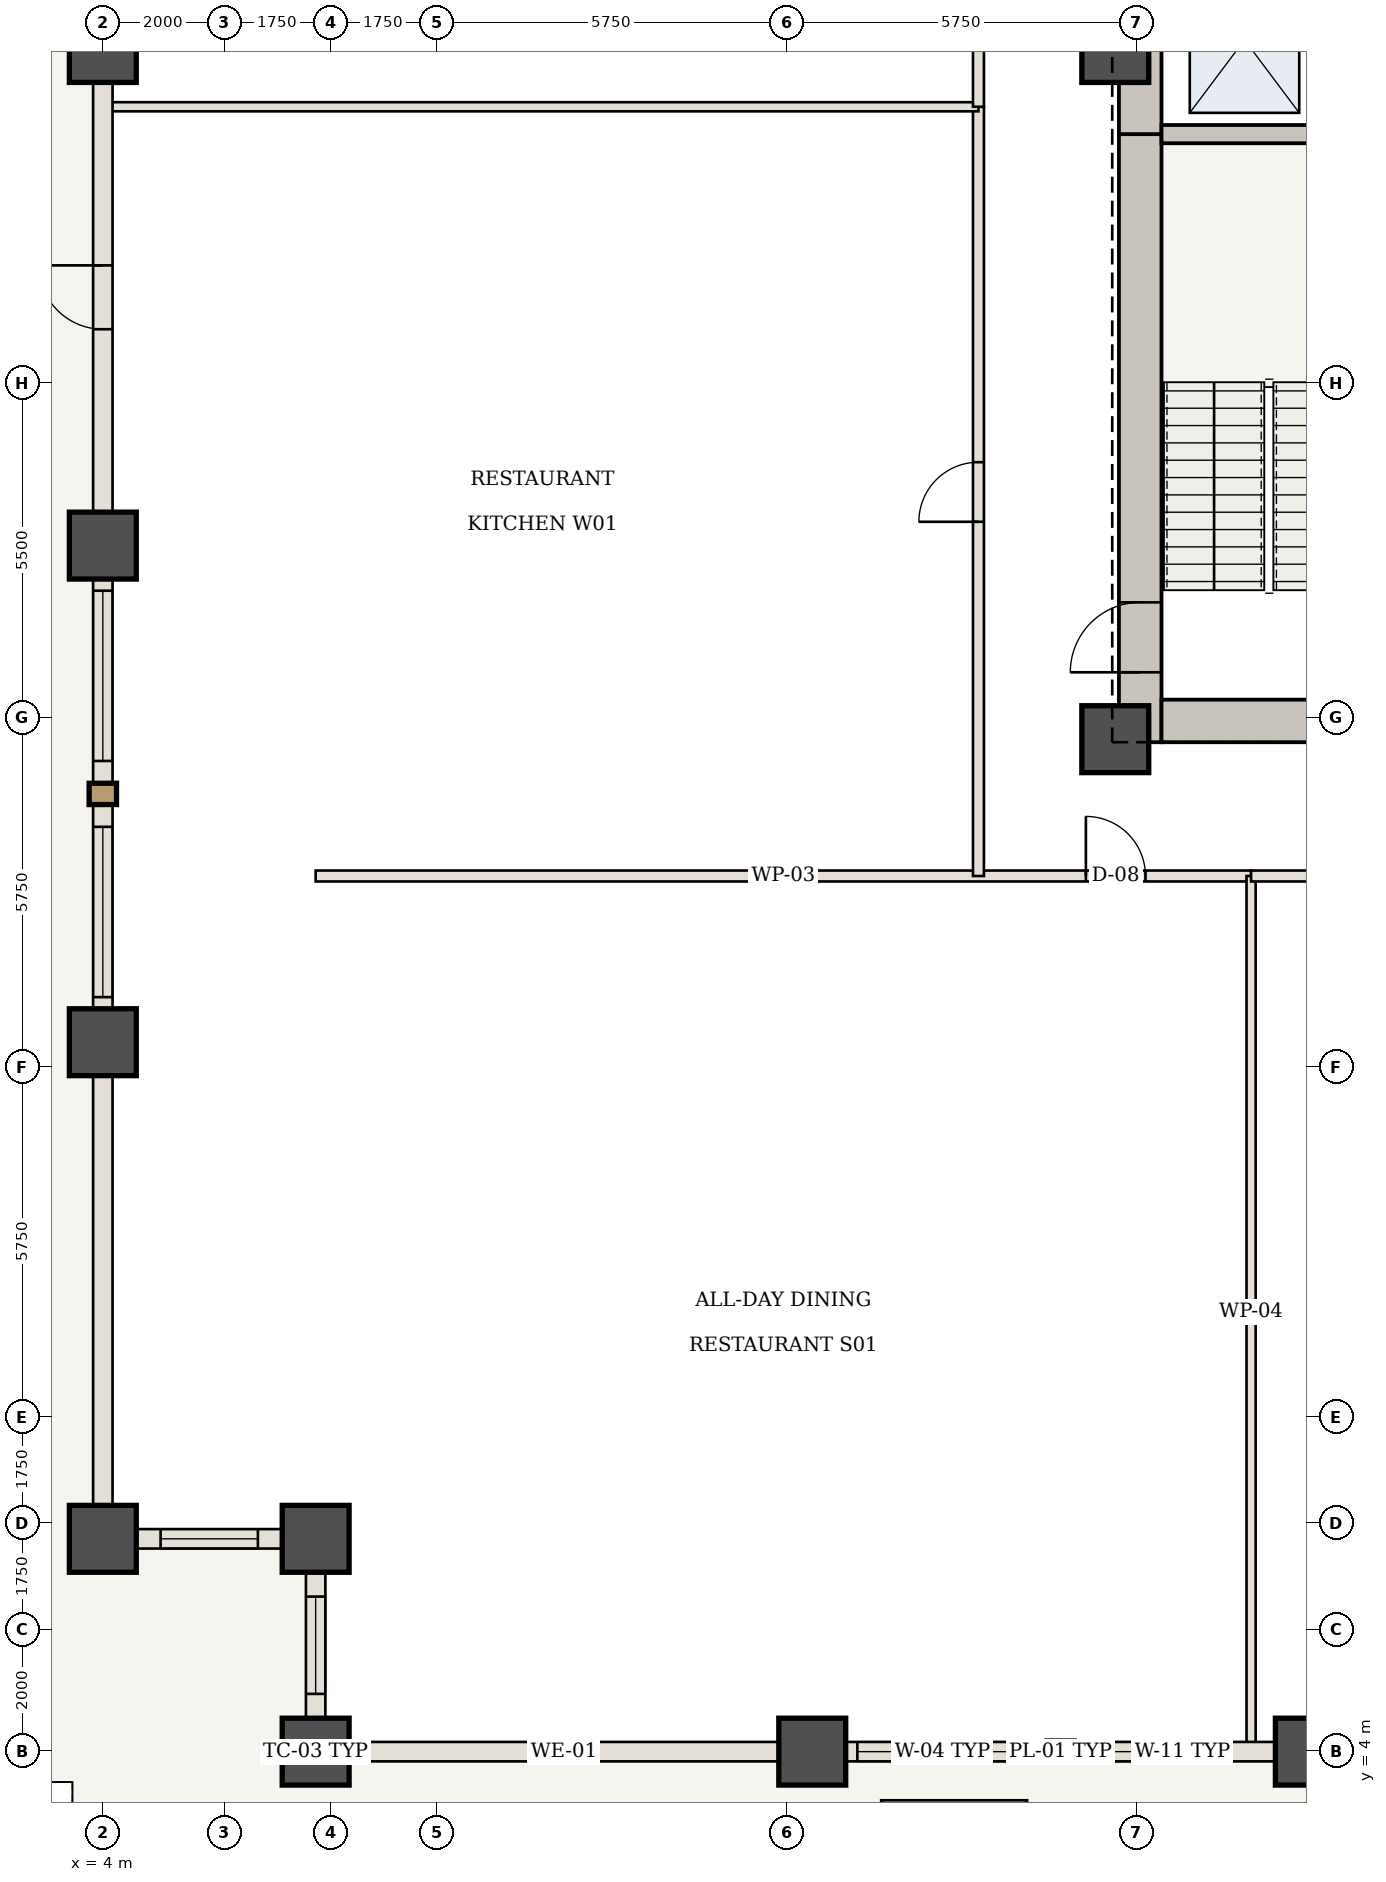
"""IFC4 building model, lengths in metres.
Left out: names, types, materials, properties, quantities, classifications, styles, units other than length and angle.
Written with IfcOpenShell. Run it as: python <this file> out.ifc"""

import sys

from ifc_helpers import new_model, si_unit, direction, frame, frame_2d, origin, origin_2d, place, context, subcontext, project, spatial, rectangle, extrude, element, fill, save


model = new_model("IFC4")
c1 = context("Model", 3, precision=1e-05, world=origin(), true_north=direction((0.0, 1.0)))
c2 = subcontext(c1, "Body", "Model", "MODEL_VIEW")
j1 = project(units=[si_unit("LENGTHUNIT", "METRE"), si_unit("PLANEANGLEUNIT", "RADIAN")], contexts=[c1])
p1 = place(None, origin())
s1 = spatial("IfcSite", under=j1, at=p1, CompositionType="ELEMENT")
p2 = place(p1, origin())
s2 = spatial("IfcBuilding", under=s1, at=p2, CompositionType="ELEMENT")
p3 = place(p2, frame((0.0, 0.0, 34.3)))
s3 = spatial("IfcBuildingStorey", under=s2, at=p3, CompositionType="ELEMENT", Elevation=34.3)
p4 = place(p3, frame((21.06, 20.6, 0.0), z_axis=(0.0, 0.0, 1.0), x_axis=(0.0, 1.0, 0.0)))
e1 = element("IfcWall", 1, at=p4, inside=s3, PredefinedType="SHEAR", context=c2, shape_type="SweptSolid", body=[
    extrude(rectangle(XDim=10.0, YDim=0.7, at=frame_2d((5.0, 0.0))), origin(), (0.0, 0.0, 1.0), 4.55),
])
p5 = place(p4, frame((1.15, 0.0, 0.0)))
e2 = element("IfcOpeningElement", 2, at=p5, cuts=e1, PredefinedType="OPENING", context=c2, shape_type="SweptSolid", body=[
    extrude(rectangle(XDim=1.15, YDim=2.15, at=frame_2d((0.575, 1.075))), frame((0.0, 0.36, 0.0), z_axis=(0.0, -1.0, 0.0), x_axis=(1.0, 0.0, 0.0)), (0.0, 0.0, 1.0), 0.72),
])
p6 = place(p3, frame((21.06, 30.6, 0.0), z_axis=(0.0, 0.0, 1.0), x_axis=(0.0, 1.0, 0.0)))
e3 = element("IfcWall", 3, at=p6, inside=s3, PredefinedType="SHEAR", context=c2, shape_type="SweptSolid", body=[
    extrude(rectangle(XDim=12.75, YDim=0.7, at=frame_2d((6.375, 0.0))), origin(), (0.0, 0.0, 1.0), 4.55),
])
p7 = place(p6, frame((4.2, 0.0, 0.0)))
e4 = element("IfcOpeningElement", 4, at=p7, cuts=e3, PredefinedType="OPENING", context=c2, shape_type="SweptSolid", body=[
    extrude(rectangle(XDim=1.1, YDim=2.15, at=frame_2d((0.55, 1.075))), frame((0.0, 0.36, 0.0), z_axis=(0.0, -1.0, 0.0), x_axis=(1.0, 0.0, 0.0)), (0.0, 0.0, 1.0), 0.72),
])
p8 = place(p6, frame((9.2, 0.0, 0.0)))
e5 = element("IfcOpeningElement", 5, at=p8, cuts=e3, PredefinedType="OPENING", context=c2, shape_type="SweptSolid", body=[
    extrude(rectangle(XDim=0.92, YDim=2.1, at=frame_2d((0.46, 1.05))), frame((0.0, 0.36, 0.0), z_axis=(0.0, -1.0, 0.0), x_axis=(1.0, 0.0, 0.0)), (0.0, 0.0, 1.0), 0.72),
])
p9 = place(p3, frame((21.41, 20.95, 0.0), z_axis=(0.0, 0.0, 1.0), x_axis=(1.0, 0.0, 0.0)))
e6 = element("IfcWall", 6, at=p9, inside=s3, PredefinedType="SHEAR", context=c2, shape_type="SweptSolid", body=[
    extrude(rectangle(XDim=13.74, YDim=0.7, at=frame_2d((6.87, 0.0))), origin(), (0.0, 0.0, 1.0), 4.55),
])
for number, where, z_axis, x_axis in (
    (7, (20.65, 20.65, 0.0), (0.0, 0.0, 1.0), (1.0, 0.0, 0.0)),
    (8, (20.65, 32.0, 0.0), (0.0, 0.0, 1.0), (1.0, 0.0, 0.0)),
):
    element("IfcColumn", number, at=place(p3, frame(where, z_axis=z_axis, x_axis=x_axis)), inside=s3, PredefinedType="COLUMN", context=c2, shape_type="SweptSolid", body=[
        extrude(rectangle(XDim=1.1, YDim=1.1, at=origin_2d()), origin(), (0.0, 0.0, 1.0), 4.55),
    ])
for number, where, z_axis, x_axis in (
    (9, (7.5, 4.0, -0.42), (0.0, 0.0, 1.0), (1.0, 0.0, 0.0)),
    (10, (7.5, 7.5, -0.42), (0.0, 0.0, 1.0), (1.0, 0.0, 0.0)),
    (11, (4.0, 7.5, -0.42), (0.0, 0.0, 1.0), (1.0, 0.0, 0.0)),
    (12, (15.667, 4.0, -0.42), (0.0, 0.0, 1.0), (1.0, 0.0, 0.0)),
    (13, (4.0, 15.667, -0.42), (0.0, 0.0, 1.0), (1.0, 0.0, 0.0)),
    (14, (23.833, 4.0, -0.42), (0.0, 0.0, 1.0), (1.0, 0.0, 0.0)),
    (15, (4.0, 23.833, -0.42), (0.0, 0.0, 1.0), (1.0, 0.0, 0.0)),
    (16, (4.0, 32.0, -0.42), (0.0, 0.0, 1.0), (1.0, 0.0, 0.0)),
):
    element("IfcColumn", number, at=place(p3, frame(where, z_axis=z_axis, x_axis=x_axis)), inside=s3, PredefinedType="COLUMN", context=c2, shape_type="SweptSolid", body=[
        extrude(rectangle(XDim=1.1, YDim=1.1, at=origin_2d()), origin(), (0.0, 0.0, 1.0), 4.97),
    ])
p10 = place(p3, frame((21.41, 30.6, 0.0), z_axis=(0.0, 0.0, 1.0), x_axis=(1.0, 0.0, 0.0)))
e17 = element("IfcWall", 17, at=p10, inside=s3, PredefinedType="SHEAR", context=c2, shape_type="SweptSolid", body=[
    extrude(rectangle(XDim=3.53, YDim=0.3, at=frame_2d((1.765, 0.0))), origin(), (0.0, 0.0, 1.0), 4.13),
])
p11 = place(p3, frame((7.5, 18.4, 0.0), z_axis=(0.0, 0.0, 1.0), x_axis=(1.0, 0.0, 0.0)))
e18 = element("IfcWall", 18, at=p11, inside=s3, PredefinedType="STANDARD", context=c2, shape_type="SweptSolid", body=[
    extrude(rectangle(XDim=15.383, YDim=0.18, at=frame_2d((7.692, 0.0))), origin(), (0.0, 0.0, 1.0), 4.13),
])
p12 = place(p11, frame((12.667, 0.0, 0.0)))
e19 = element("IfcOpeningElement", 19, at=p12, cuts=e18, PredefinedType="OPENING", context=c2, shape_type="SweptSolid", body=[
    extrude(rectangle(XDim=0.98, YDim=2.2, at=frame_2d((0.49, 1.1))), frame((0.0, 0.1, 0.0), z_axis=(0.0, -1.0, 0.0), x_axis=(1.0, 0.0, 0.0)), (0.0, 0.0, 1.0), 0.2),
])
p13 = place(p3, frame((22.883, 4.06, 0.0), z_axis=(0.0, 0.0, 1.0), x_axis=(0.0, 1.0, 0.0)))
e20 = element("IfcWall", 20, at=p13, inside=s3, PredefinedType="STANDARD", context=c2, shape_type="SweptSolid", body=[
    extrude(rectangle(XDim=14.34, YDim=0.15, at=frame_2d((7.17, 0.0))), origin(), (0.0, 0.0, 1.0), 4.13),
])
p14 = place(p3, frame((22.883, 18.4, 0.0), z_axis=(0.0, 0.0, 1.0), x_axis=(1.0, 0.0, 0.0)))
e21 = element("IfcWall", 21, at=p14, inside=s3, PredefinedType="STANDARD", context=c2, shape_type="SweptSolid", body=[
    extrude(rectangle(XDim=18.033, YDim=0.18, at=frame_2d((9.017, 0.0))), origin(), (0.0, 0.0, 1.0), 4.13),
])
p15 = place(p14, frame((9.967, 0.0, 0.0)))
e22 = element("IfcOpeningElement", 22, at=p15, cuts=e21, PredefinedType="OPENING", context=c2, shape_type="SweptSolid", body=[
    extrude(rectangle(XDim=0.98, YDim=2.2, at=frame_2d((0.49, 1.1))), frame((0.0, 0.1, 0.0), z_axis=(0.0, -1.0, 0.0), x_axis=(1.0, 0.0, 0.0)), (0.0, 0.0, 1.0), 0.2),
])
p16 = place(p3, frame((18.4, 18.4, 0.0), z_axis=(0.0, 0.0, 1.0), x_axis=(0.0, 1.0, 0.0)))
e23 = element("IfcWall", 23, at=p16, inside=s3, PredefinedType="STANDARD", context=c2, shape_type="SweptSolid", body=[
    extrude(rectangle(XDim=12.65, YDim=0.18, at=frame_2d((6.325, 0.0))), origin(), (0.0, 0.0, 1.0), 4.13),
])
p17 = place(p16, frame((5.825, 0.0, 0.0)))
e24 = element("IfcOpeningElement", 24, at=p17, cuts=e23, PredefinedType="OPENING", context=c2, shape_type="SweptSolid", body=[
    extrude(rectangle(XDim=0.98, YDim=2.2, at=frame_2d((0.49, 1.1))), frame((0.0, 0.1, 0.0), z_axis=(0.0, -1.0, 0.0), x_axis=(1.0, 0.0, 0.0)), (0.0, 0.0, 1.0), 0.2),
])
p18 = place(p3, frame((4.06, 31.05, 0.0), z_axis=(0.0, 0.0, 1.0), x_axis=(1.0, 0.0, 0.0)))
e25 = element("IfcWall", 25, at=p18, inside=s3, PredefinedType="STANDARD", context=c2, shape_type="SweptSolid", body=[
    extrude(rectangle(XDim=14.34, YDim=0.15, at=frame_2d((7.17, 0.0))), origin(), (0.0, 0.0, 1.0), 4.13),
])
p19 = place(p3, frame((18.4, 31.05, 0.0), z_axis=(0.0, 0.0, 1.0), x_axis=(0.0, 1.0, 0.0)))
e26 = element("IfcWall", 26, at=p19, inside=s3, PredefinedType="STANDARD", context=c2, shape_type="SweptSolid", body=[
    extrude(rectangle(XDim=14.55, YDim=0.18, at=frame_2d((7.275, 0.0))), origin(), (0.0, 0.0, 1.0), 4.13),
])
p20 = place(p19, frame((6.775, 0.0, 0.0)))
e27 = element("IfcOpeningElement", 27, at=p20, cuts=e26, PredefinedType="OPENING", context=c2, shape_type="SweptSolid", body=[
    extrude(rectangle(XDim=0.98, YDim=2.2, at=frame_2d((0.49, 1.1))), frame((0.0, 0.1, 0.0), z_axis=(0.0, -1.0, 0.0), x_axis=(1.0, 0.0, 0.0)), (0.0, 0.0, 1.0), 0.2),
])
p21 = place(p3, frame((15.667, 4.0, 0.0), z_axis=(0.0, 0.0, 1.0), x_axis=(-1.0, 0.0, 0.0)))
e28 = element("IfcWall", 28, at=p21, inside=s3, PredefinedType="USERDEFINED", context=c2, shape_type="SweptSolid", body=[
    extrude(rectangle(XDim=8.167, YDim=0.32, at=frame_2d((4.083, 0.0))), origin(), (0.0, 0.0, 1.0), 3.33),
])
p22 = place(p3, frame((23.833, 4.0, 0.0), z_axis=(0.0, 0.0, 1.0), x_axis=(-1.0, 0.0, 0.0)))
e29 = element("IfcWall", 29, at=p22, inside=s3, PredefinedType="USERDEFINED", context=c2, shape_type="SweptSolid", body=[
    extrude(rectangle(XDim=8.167, YDim=0.32, at=frame_2d((4.083, 0.0))), origin(), (0.0, 0.0, 1.0), 3.33),
])
p23 = place(p22, frame((1.654, 0.0, 0.85)))
e30 = element("IfcOpeningElement", 30, at=p23, cuts=e29, PredefinedType="OPENING", context=c2, shape_type="SweptSolid", body=[
    extrude(rectangle(XDim=1.6, YDim=2.15, at=frame_2d((0.8, 1.075))), frame((0.0, 0.17, 0.0), z_axis=(0.0, -1.0, 0.0), x_axis=(1.0, 0.0, 0.0)), (0.0, 0.0, 1.0), 0.34),
])
p24 = place(p22, frame((4.625, 0.0, 0.85)))
e31 = element("IfcOpeningElement", 31, at=p24, cuts=e29, PredefinedType="OPENING", context=c2, shape_type="SweptSolid", body=[
    extrude(rectangle(XDim=2.8, YDim=2.05, at=frame_2d((1.4, 1.025))), frame((0.0, 0.17, 0.0), z_axis=(0.0, -1.0, 0.0), x_axis=(1.0, 0.0, 0.0)), (0.0, 0.0, 1.0), 0.34),
])
p25 = place(p3, frame((4.0, 7.5, 0.0), z_axis=(0.0, 0.0, 1.0), x_axis=(0.0, 1.0, 0.0)))
e32 = element("IfcWall", 32, at=p25, inside=s3, PredefinedType="USERDEFINED", context=c2, shape_type="SweptSolid", body=[
    extrude(rectangle(XDim=8.167, YDim=0.32, at=frame_2d((4.083, 0.0))), origin(), (0.0, 0.0, 1.0), 3.33),
])
p26 = place(p3, frame((4.0, 15.667, 0.0), z_axis=(0.0, 0.0, 1.0), x_axis=(0.0, 1.0, 0.0)))
e33 = element("IfcWall", 33, at=p26, inside=s3, PredefinedType="USERDEFINED", context=c2, shape_type="SweptSolid", body=[
    extrude(rectangle(XDim=8.167, YDim=0.32, at=frame_2d((4.083, 0.0))), origin(), (0.0, 0.0, 1.0), 3.33),
])
p27 = place(p26, frame((0.742, 0.0, 0.85)))
e34 = element("IfcOpeningElement", 34, at=p27, cuts=e33, PredefinedType="OPENING", context=c2, shape_type="SweptSolid", body=[
    extrude(rectangle(XDim=2.8, YDim=2.05, at=frame_2d((1.4, 1.025))), frame((0.0, 0.17, 0.0), z_axis=(0.0, -1.0, 0.0), x_axis=(1.0, 0.0, 0.0)), (0.0, 0.0, 1.0), 0.34),
])
p28 = place(p26, frame((4.625, 0.0, 0.85)))
e35 = element("IfcOpeningElement", 35, at=p28, cuts=e33, PredefinedType="OPENING", context=c2, shape_type="SweptSolid", body=[
    extrude(rectangle(XDim=2.8, YDim=2.05, at=frame_2d((1.4, 1.025))), frame((0.0, 0.17, 0.0), z_axis=(0.0, -1.0, 0.0), x_axis=(1.0, 0.0, 0.0)), (0.0, 0.0, 1.0), 0.34),
])
p29 = place(p3, frame((4.0, 23.833, 0.0), z_axis=(0.0, 0.0, 1.0), x_axis=(0.0, 1.0, 0.0)))
e36 = element("IfcWall", 36, at=p29, inside=s3, PredefinedType="USERDEFINED", context=c2, shape_type="SweptSolid", body=[
    extrude(rectangle(XDim=8.167, YDim=0.32, at=frame_2d((4.083, 0.0))), origin(), (0.0, 0.0, 1.0), 3.33),
])
p30 = place(p29, frame((3.558, 0.0, 0.0)))
e37 = element("IfcOpeningElement", 37, at=p30, cuts=e36, PredefinedType="OPENING", context=c2, shape_type="SweptSolid", body=[
    extrude(rectangle(XDim=1.05, YDim=2.2, at=frame_2d((0.525, 1.1))), frame((0.0, 0.17, 0.0), z_axis=(0.0, -1.0, 0.0), x_axis=(1.0, 0.0, 0.0)), (0.0, 0.0, 1.0), 0.34),
])
p31 = place(p3, frame((7.5, 4.0, 0.0), z_axis=(0.0, 0.0, 1.0), x_axis=(0.0, 1.0, 0.0)))
e38 = element("IfcWall", 38, at=p31, inside=s3, PredefinedType="USERDEFINED", context=c2, shape_type="SweptSolid", body=[
    extrude(rectangle(XDim=3.5, YDim=0.32, at=frame_2d((1.75, 0.0))), origin(), (0.0, 0.0, 1.0), 3.33),
])
p32 = place(p31, frame((0.95, 0.0, 0.85)))
e39 = element("IfcOpeningElement", 39, at=p32, cuts=e38, PredefinedType="OPENING", context=c2, shape_type="SweptSolid", body=[
    extrude(rectangle(XDim=1.6, YDim=2.05, at=frame_2d((0.8, 1.025))), frame((0.0, 0.17, 0.0), z_axis=(0.0, -1.0, 0.0), x_axis=(1.0, 0.0, 0.0)), (0.0, 0.0, 1.0), 0.34),
])
p33 = place(p3, frame((7.5, 7.5, 0.0), z_axis=(0.0, 0.0, 1.0), x_axis=(-1.0, 0.0, 0.0)))
e40 = element("IfcWall", 40, at=p33, inside=s3, PredefinedType="USERDEFINED", context=c2, shape_type="SweptSolid", body=[
    extrude(rectangle(XDim=3.5, YDim=0.32, at=frame_2d((1.75, 0.0))), origin(), (0.0, 0.0, 1.0), 3.33),
])
p34 = place(p33, frame((0.95, 0.0, 0.85)))
e41 = element("IfcOpeningElement", 41, at=p34, cuts=e40, PredefinedType="OPENING", context=c2, shape_type="SweptSolid", body=[
    extrude(rectangle(XDim=1.6, YDim=2.05, at=frame_2d((0.8, 1.025))), frame((0.0, 0.17, 0.0), z_axis=(0.0, -1.0, 0.0), x_axis=(1.0, 0.0, 0.0)), (0.0, 0.0, 1.0), 0.34),
])
p35 = place(p5, origin())
e42 = element("IfcDoor", 42, at=p35, inside=s3, OperationType="SINGLE_SWING_LEFT", PredefinedType="DOOR", context=c2, shape_type="SweptSolid", body=[
    extrude(rectangle(XDim=1.15, YDim=2.15, at=frame_2d((0.575, 1.075))), frame((0.0, 0.025, 0.0), z_axis=(0.0, -1.0, 0.0), x_axis=(1.0, 0.0, 0.0)), (0.0, 0.0, 1.0), 0.05),
])
fill(e2, e42)
p36 = place(p12, origin())
e43 = element("IfcDoor", 43, at=p36, inside=s3, OperationType="SINGLE_SWING_LEFT", PredefinedType="DOOR", context=c2, shape_type="SweptSolid", body=[
    extrude(rectangle(XDim=0.98, YDim=2.2, at=frame_2d((0.49, 1.1))), frame((0.0, 0.025, 0.0), z_axis=(0.0, -1.0, 0.0), x_axis=(1.0, 0.0, 0.0)), (0.0, 0.0, 1.0), 0.05),
])
fill(e19, e43)
p37 = place(p17, origin())
e44 = element("IfcDoor", 44, at=p37, inside=s3, OperationType="SINGLE_SWING_LEFT", PredefinedType="DOOR", context=c2, shape_type="SweptSolid", body=[
    extrude(rectangle(XDim=0.98, YDim=2.2, at=frame_2d((0.49, 1.1))), frame((0.0, 0.025, 0.0), z_axis=(0.0, -1.0, 0.0), x_axis=(1.0, 0.0, 0.0)), (0.0, 0.0, 1.0), 0.05),
])
fill(e24, e44)
p38 = place(p3, frame((0.0, 0.0, -0.25)))
p39 = place(p38, frame((18.0, 2.0, 0.0)))
p40 = place(p39, frame((0.0, 0.0, 0.2)))
e45 = element("IfcWindow", 45, at=p40, inside=s3, PartitioningType="SINGLE_PANEL", PredefinedType="SKYLIGHT", context=c2, shape_type="SweptSolid", body=[
    extrude(rectangle(XDim=2.4, YDim=2.4, at=origin_2d()), origin(), (0.0, 0.0, 1.0), 0.05),
])
p41 = place(p23, origin())
e46 = element("IfcWindow", 46, at=p41, inside=s3, PartitioningType="SINGLE_PANEL", PredefinedType="WINDOW", context=c2, shape_type="SweptSolid", body=[
    extrude(rectangle(XDim=1.6, YDim=2.15, at=frame_2d((0.8, 1.075))), frame((0.0, 0.03, 0.0), z_axis=(0.0, -1.0, 0.0), x_axis=(1.0, 0.0, 0.0)), (0.0, 0.0, 1.0), 0.06),
])
fill(e30, e46)
p42 = place(p24, origin())
e47 = element("IfcWindow", 47, at=p42, inside=s3, PartitioningType="SINGLE_PANEL", PredefinedType="WINDOW", context=c2, shape_type="SweptSolid", body=[
    extrude(rectangle(XDim=2.8, YDim=2.05, at=frame_2d((1.4, 1.025))), frame((0.0, 0.03, 0.0), z_axis=(0.0, -1.0, 0.0), x_axis=(1.0, 0.0, 0.0)), (0.0, 0.0, 1.0), 0.06),
])
fill(e31, e47)
p43 = place(p27, origin())
e48 = element("IfcWindow", 48, at=p43, inside=s3, PartitioningType="SINGLE_PANEL", PredefinedType="WINDOW", context=c2, shape_type="SweptSolid", body=[
    extrude(rectangle(XDim=2.8, YDim=2.05, at=frame_2d((1.4, 1.025))), frame((0.0, 0.03, 0.0), z_axis=(0.0, -1.0, 0.0), x_axis=(1.0, 0.0, 0.0)), (0.0, 0.0, 1.0), 0.06),
])
fill(e34, e48)
p44 = place(p28, origin())
e49 = element("IfcWindow", 49, at=p44, inside=s3, PartitioningType="SINGLE_PANEL", PredefinedType="WINDOW", context=c2, shape_type="SweptSolid", body=[
    extrude(rectangle(XDim=2.8, YDim=2.05, at=frame_2d((1.4, 1.025))), frame((0.0, 0.03, 0.0), z_axis=(0.0, -1.0, 0.0), x_axis=(1.0, 0.0, 0.0)), (0.0, 0.0, 1.0), 0.06),
])
fill(e35, e49)
p45 = place(p30, origin())
e50 = element("IfcDoor", 50, at=p45, inside=s3, OperationType="SINGLE_SWING_RIGHT", PredefinedType="DOOR", context=c2, shape_type="SweptSolid", body=[
    extrude(rectangle(XDim=1.05, YDim=2.2, at=frame_2d((0.525, 1.1))), frame((0.0, 0.025, 0.0), z_axis=(0.0, -1.0, 0.0), x_axis=(1.0, 0.0, 0.0)), (0.0, 0.0, 1.0), 0.05),
])
fill(e37, e50)
p46 = place(p32, origin())
e51 = element("IfcWindow", 51, at=p46, inside=s3, PartitioningType="SINGLE_PANEL", PredefinedType="WINDOW", context=c2, shape_type="SweptSolid", body=[
    extrude(rectangle(XDim=1.6, YDim=2.05, at=frame_2d((0.8, 1.025))), frame((0.0, 0.03, 0.0), z_axis=(0.0, -1.0, 0.0), x_axis=(1.0, 0.0, 0.0)), (0.0, 0.0, 1.0), 0.06),
])
fill(e39, e51)
p47 = place(p34, origin())
e52 = element("IfcWindow", 52, at=p47, inside=s3, PartitioningType="SINGLE_PANEL", PredefinedType="WINDOW", context=c2, shape_type="SweptSolid", body=[
    extrude(rectangle(XDim=1.6, YDim=2.05, at=frame_2d((0.8, 1.025))), frame((0.0, 0.03, 0.0), z_axis=(0.0, -1.0, 0.0), x_axis=(1.0, 0.0, 0.0)), (0.0, 0.0, 1.0), 0.06),
])
fill(e41, e52)
save(model, sys.argv[1])
